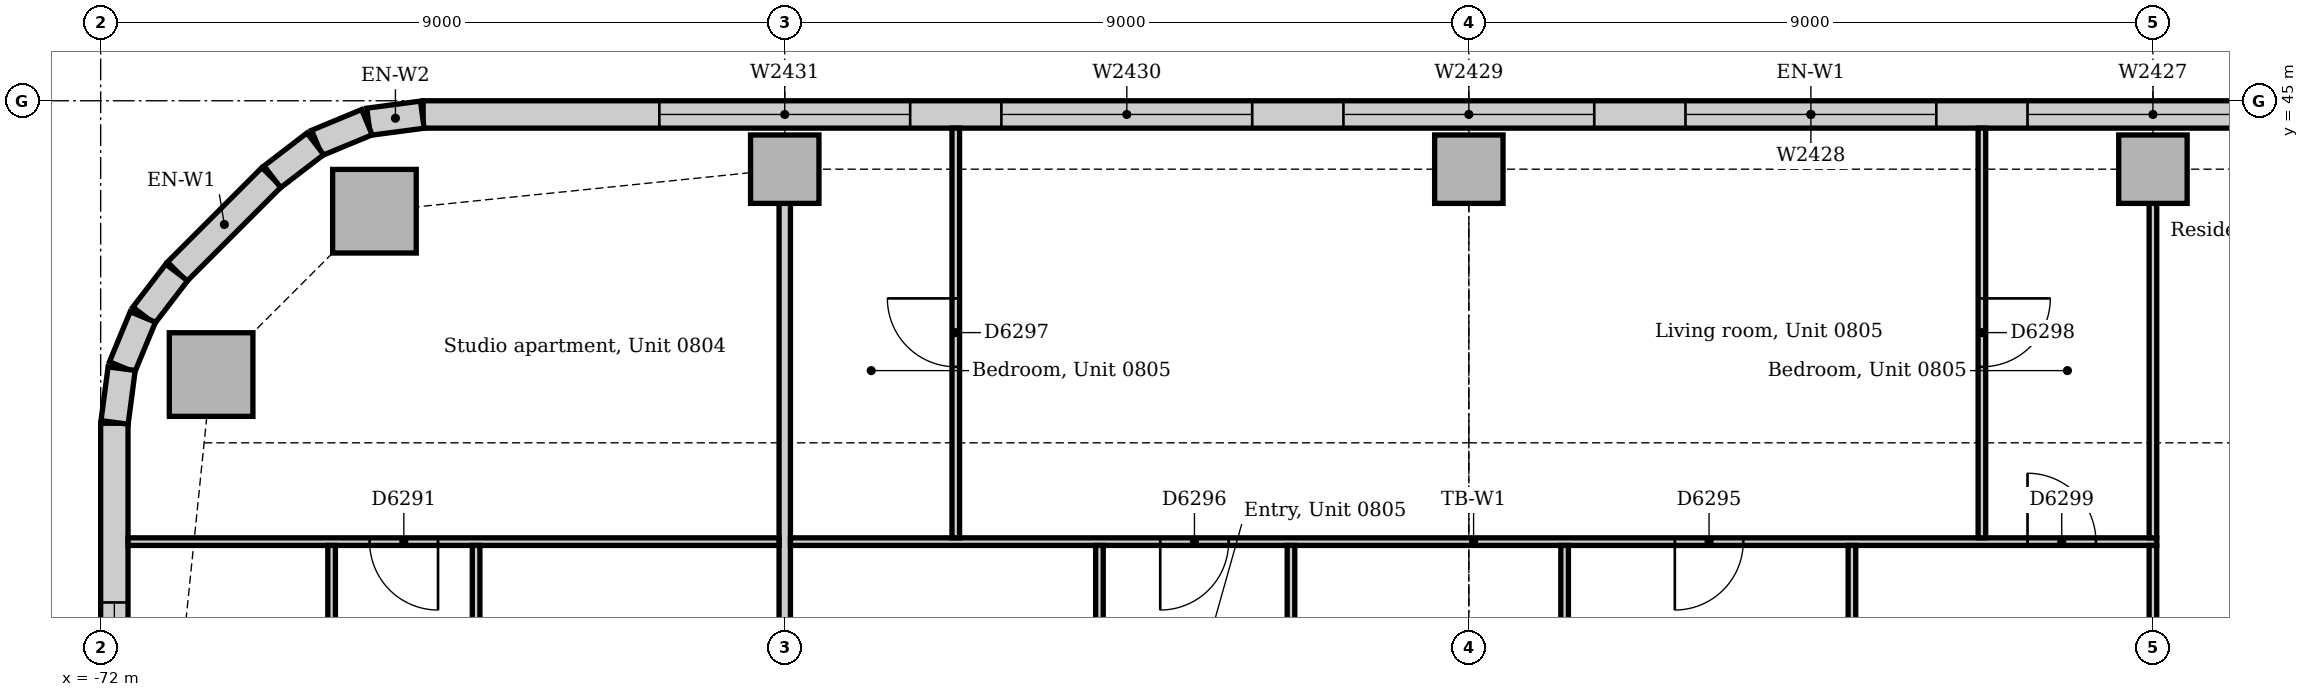
"""IFC4 building model, lengths in metres.
Left out: names, types, materials, properties, quantities, classifications, styles, units other than length and angle.
Written with IfcOpenShell. Run it as: python <this file> out.ifc"""

import sys

from ifc_helpers import new_model, si_unit, direction, frame, frame_2d, origin, origin_2d, place, context, subcontext, project, spatial, rectangle, extrude, element, fill, save


model = new_model("IFC4")
c1 = context("Model", 3, precision=1e-05, world=origin(), true_north=direction((0.0, 1.0)))
c2 = subcontext(c1, "Body", "Model", "MODEL_VIEW")
j1 = project(units=[si_unit("LENGTHUNIT", "METRE"), si_unit("PLANEANGLEUNIT", "RADIAN")], contexts=[c1])
p1 = place(None, origin())
s1 = spatial("IfcSite", under=j1, at=p1, CompositionType="ELEMENT")
p2 = place(p1, origin())
s2 = spatial("IfcBuilding", under=s1, at=p2, CompositionType="ELEMENT")
p3 = place(p2, frame((0.0, 0.0, 38.0)))
s3 = spatial("IfcBuildingStorey", under=s2, at=p3, CompositionType="ELEMENT", Elevation=38.0)
for number, where, z_axis, x_axis in (
    (1, (-68.398, 43.547, 0.0), (0.0, 0.0, 1.0), (1.0, 0.0, 0.0)),
    (2, (-70.547, 41.398, 0.0), (0.0, 0.0, 1.0), (1.0, 0.0, 0.0)),
):
    element("IfcColumn", number, at=place(p3, frame(where, z_axis=z_axis, x_axis=x_axis)), inside=s3, PredefinedType="COLUMN", context=c2, shape_type="SweptSolid", body=[
        extrude(rectangle(XDim=1.1, YDim=1.1, at=origin_2d()), origin(), (0.0, 0.0, 1.0), 3.85),
    ])
for number, where, z_axis, x_axis in (
    (3, (-63.0, 44.1, 0.0), (0.0, 0.0, 1.0), (1.0, 0.0, 0.0)),
    (4, (-54.0, 44.1, 0.0), (0.0, 0.0, 1.0), (1.0, 0.0, 0.0)),
    (5, (-45.0, 44.1, 0.0), (0.0, 0.0, 1.0), (1.0, 0.0, 0.0)),
):
    element("IfcColumn", number, at=place(p3, frame(where, z_axis=z_axis, x_axis=x_axis)), inside=s3, PredefinedType="COLUMN", context=c2, shape_type="SweptSolid", body=[
        extrude(rectangle(XDim=0.9, YDim=0.9, at=origin_2d()), origin(), (0.0, 0.0, 1.0), 3.85),
    ])
p4 = place(p3, frame((-31.243, 44.82, 0.0), z_axis=(0.0, 0.0, 1.0), x_axis=(-1.0, 0.0, 0.0)))
e6 = element("IfcWall", 6, at=p4, inside=s3, PredefinedType="STANDARD", context=c2, shape_type="SweptSolid", body=[
    extrude(rectangle(XDim=36.515, YDim=0.36, at=frame_2d((18.257, 0.0))), origin(), (0.0, 0.0, 1.0), 3.85),
])
p5 = place(p4, frame((3.107, 0.0, 0.9)))
e7 = element("IfcOpeningElement", 7, at=p5, cuts=e6, PredefinedType="OPENING", context=c2, shape_type="SweptSolid", body=[
    extrude(rectangle(XDim=3.3, YDim=1.6, at=frame_2d((1.65, 0.8))), frame((0.0, 0.19, 0.0), z_axis=(0.0, -1.0, 0.0), x_axis=(1.0, 0.0, 0.0)), (0.0, 0.0, 1.0), 0.38),
])
p6 = place(p4, frame((7.607, 0.0, 0.9)))
e8 = element("IfcOpeningElement", 8, at=p6, cuts=e6, PredefinedType="OPENING", context=c2, shape_type="SweptSolid", body=[
    extrude(rectangle(XDim=3.3, YDim=1.6, at=frame_2d((1.65, 0.8))), frame((0.0, 0.19, 0.0), z_axis=(0.0, -1.0, 0.0), x_axis=(1.0, 0.0, 0.0)), (0.0, 0.0, 1.0), 0.38),
])
p7 = place(p4, frame((12.107, 0.0, 0.9)))
e9 = element("IfcOpeningElement", 9, at=p7, cuts=e6, PredefinedType="OPENING", context=c2, shape_type="SweptSolid", body=[
    extrude(rectangle(XDim=3.3, YDim=1.6, at=frame_2d((1.65, 0.8))), frame((0.0, 0.19, 0.0), z_axis=(0.0, -1.0, 0.0), x_axis=(1.0, 0.0, 0.0)), (0.0, 0.0, 1.0), 0.38),
])
p8 = place(p4, frame((16.607, 0.0, 0.9)))
e10 = element("IfcOpeningElement", 10, at=p8, cuts=e6, PredefinedType="OPENING", context=c2, shape_type="SweptSolid", body=[
    extrude(rectangle(XDim=3.3, YDim=1.6, at=frame_2d((1.65, 0.8))), frame((0.0, 0.19, 0.0), z_axis=(0.0, -1.0, 0.0), x_axis=(1.0, 0.0, 0.0)), (0.0, 0.0, 1.0), 0.38),
])
p9 = place(p4, frame((21.107, 0.0, 0.9)))
e11 = element("IfcOpeningElement", 11, at=p9, cuts=e6, PredefinedType="OPENING", context=c2, shape_type="SweptSolid", body=[
    extrude(rectangle(XDim=3.3, YDim=1.6, at=frame_2d((1.65, 0.8))), frame((0.0, 0.19, 0.0), z_axis=(0.0, -1.0, 0.0), x_axis=(1.0, 0.0, 0.0)), (0.0, 0.0, 1.0), 0.38),
])
p10 = place(p4, frame((25.607, 0.0, 0.9)))
e12 = element("IfcOpeningElement", 12, at=p10, cuts=e6, PredefinedType="OPENING", context=c2, shape_type="SweptSolid", body=[
    extrude(rectangle(XDim=3.3, YDim=1.6, at=frame_2d((1.65, 0.8))), frame((0.0, 0.19, 0.0), z_axis=(0.0, -1.0, 0.0), x_axis=(1.0, 0.0, 0.0)), (0.0, 0.0, 1.0), 0.38),
])
p11 = place(p4, frame((30.107, 0.0, 0.9)))
e13 = element("IfcOpeningElement", 13, at=p11, cuts=e6, PredefinedType="OPENING", context=c2, shape_type="SweptSolid", body=[
    extrude(rectangle(XDim=3.3, YDim=1.6, at=frame_2d((1.65, 0.8))), frame((0.0, 0.19, 0.0), z_axis=(0.0, -1.0, 0.0), x_axis=(1.0, 0.0, 0.0)), (0.0, 0.0, 1.0), 0.38),
])
p12 = place(p3, frame((-69.751, 43.994, 0.0), z_axis=(0.0, 0.0, 1.0), x_axis=(-0.707106781187, -0.707106781187, 0.0)))
e14 = element("IfcWall", 14, at=p12, inside=s3, PredefinedType="STANDARD", context=c2, shape_type="SweptSolid", body=[
    extrude(rectangle(XDim=1.757, YDim=0.36, at=frame_2d((0.879, 0.0))), origin(), (0.0, 0.0, 1.0), 3.85),
])
p13 = place(p3, frame((-71.82, 40.757, 0.0), z_axis=(0.0, 0.0, 1.0), x_axis=(0.0, -1.0, 0.0)))
e15 = element("IfcWall", 15, at=p13, inside=s3, PredefinedType="STANDARD", context=c2, shape_type="SweptSolid", body=[
    extrude(rectangle(XDim=26.015, YDim=0.36, at=frame_2d((13.007, 0.0))), origin(), (0.0, 0.0, 1.0), 3.85),
])
p14 = place(p13, frame((2.357, 0.0, 0.9)))
e16 = element("IfcOpeningElement", 16, at=p14, cuts=e15, PredefinedType="OPENING", context=c2, shape_type="SweptSolid", body=[
    extrude(rectangle(XDim=3.3, YDim=1.6, at=frame_2d((1.65, 0.8))), frame((0.0, 0.19, 0.0), z_axis=(0.0, -1.0, 0.0), x_axis=(1.0, 0.0, 0.0)), (0.0, 0.0, 1.0), 0.38),
])
p15 = place(p13, frame((7.057, 0.0, 0.9)))
e17 = element("IfcOpeningElement", 17, at=p15, cuts=e15, PredefinedType="OPENING", context=c2, shape_type="SweptSolid", body=[
    extrude(rectangle(XDim=3.3, YDim=1.6, at=frame_2d((1.65, 0.8))), frame((0.0, 0.19, 0.0), z_axis=(0.0, -1.0, 0.0), x_axis=(1.0, 0.0, 0.0)), (0.0, 0.0, 1.0), 0.38),
])
p16 = place(p13, frame((11.357, 0.0, 0.9)))
e18 = element("IfcOpeningElement", 18, at=p16, cuts=e15, PredefinedType="OPENING", context=c2, shape_type="SweptSolid", body=[
    extrude(rectangle(XDim=3.3, YDim=1.6, at=frame_2d((1.65, 0.8))), frame((0.0, 0.19, 0.0), z_axis=(0.0, -1.0, 0.0), x_axis=(1.0, 0.0, 0.0)), (0.0, 0.0, 1.0), 0.38),
])
p17 = place(p13, frame((15.857, 0.0, 0.9)))
e19 = element("IfcOpeningElement", 19, at=p17, cuts=e15, PredefinedType="OPENING", context=c2, shape_type="SweptSolid", body=[
    extrude(rectangle(XDim=3.3, YDim=1.6, at=frame_2d((1.65, 0.8))), frame((0.0, 0.19, 0.0), z_axis=(0.0, -1.0, 0.0), x_axis=(1.0, 0.0, 0.0)), (0.0, 0.0, 1.0), 0.38),
])
p18 = place(p13, frame((20.957, 0.0, 0.9)))
e20 = element("IfcOpeningElement", 20, at=p18, cuts=e15, PredefinedType="OPENING", context=c2, shape_type="SweptSolid", body=[
    extrude(rectangle(XDim=3.3, YDim=1.6, at=frame_2d((1.65, 0.8))), frame((0.0, 0.19, 0.0), z_axis=(0.0, -1.0, 0.0), x_axis=(1.0, 0.0, 0.0)), (0.0, 0.0, 1.0), 0.38),
])
for number, where, z_axis, x_axis in (
    (21, (-67.769, 44.817, 0.0), (0.0, 0.0, 1.0), (-0.991, -0.131, 0.0)),
    (22, (-68.497, 44.718, 0.0), (0.0, 0.0, 1.0), (-0.924, -0.383, 0.0)),
):
    element("IfcWall", number, at=place(p3, frame(where, z_axis=z_axis, x_axis=x_axis)), inside=s3, PredefinedType="STANDARD", context=c2, shape_type="SweptSolid", body=[
        extrude(rectangle(XDim=0.713, YDim=0.36, at=frame_2d((0.356, 0.0))), origin(), (0.0, 0.0, 1.0), 3.85),
    ])
for number, where, z_axis, x_axis in (
    (23, (-69.175, 44.434, 0.0), (0.0, 0.0, 1.0), (-0.793, -0.609, 0.0)),
    (24, (-71.0, 42.741, 0.0), (0.0, 0.0, 1.0), (-0.609, -0.793, 0.0)),
):
    element("IfcWall", number, at=place(p3, frame(where, z_axis=z_axis, x_axis=x_axis)), inside=s3, PredefinedType="STANDARD", context=c2, shape_type="SweptSolid", body=[
        extrude(rectangle(XDim=0.713, YDim=0.36, at=frame_2d((0.357, 0.0))), origin(), (0.0, 0.0, 1.0), 3.85),
    ])
for number, where, z_axis, x_axis in (
    (25, (-71.445, 42.156, 0.0), (0.0, 0.0, 1.0), (-0.383, -0.924, 0.0)),
    (26, (-71.724, 41.476, 0.0), (0.0, 0.0, 1.0), (-0.131, -0.991, 0.0)),
):
    element("IfcWall", number, at=place(p3, frame(where, z_axis=z_axis, x_axis=x_axis)), inside=s3, PredefinedType="STANDARD", context=c2, shape_type="SweptSolid", body=[
        extrude(rectangle(XDim=0.713, YDim=0.36, at=frame_2d((0.356, 0.0))), origin(), (0.0, 0.0, 1.0), 3.85),
    ])
p19 = place(p3, frame((-63.0, 36.4, 0.0), z_axis=(0.0, 0.0, 1.0), x_axis=(0.0, 1.0, 0.0)))
e27 = element("IfcWall", 27, at=p19, inside=s3, PredefinedType="PARTITIONING", context=c2, shape_type="SweptSolid", body=[
    extrude(rectangle(XDim=7.25, YDim=0.15, at=frame_2d((3.625, 0.0))), origin(), (0.0, 0.0, 1.0), 3.158),
])
p20 = place(p3, frame((-62.925, 39.2, 0.0), z_axis=(0.0, 0.0, 1.0), x_axis=(1.0, 0.0, 0.0)))
e28 = element("IfcWall", 28, at=p20, inside=s3, PredefinedType="PARTITIONING", context=c2, shape_type="SweptSolid", body=[
    extrude(rectangle(XDim=17.975, YDim=0.1, at=frame_2d((8.988, 0.0))), origin(), (0.0, 0.0, 1.0), 3.85),
])
p21 = place(p20, frame((11.635, 0.0, 0.0)))
e29 = element("IfcOpeningElement", 29, at=p21, cuts=e28, PredefinedType="OPENING", context=c2, shape_type="SweptSolid", body=[
    extrude(rectangle(XDim=0.9, YDim=2.1, at=frame_2d((0.45, 1.05))), frame((0.0, 0.06, 0.0), z_axis=(0.0, -1.0, 0.0), x_axis=(1.0, 0.0, 0.0)), (0.0, 0.0, 1.0), 0.12),
])
p22 = place(p20, frame((4.865, 0.0, 0.0)))
e30 = element("IfcOpeningElement", 30, at=p22, cuts=e28, PredefinedType="OPENING", context=c2, shape_type="SweptSolid", body=[
    extrude(rectangle(XDim=0.9, YDim=2.1, at=frame_2d((0.45, 1.05))), frame((0.0, 0.06, 0.0), z_axis=(0.0, -1.0, 0.0), x_axis=(1.0, 0.0, 0.0)), (0.0, 0.0, 1.0), 0.12),
])
p23 = place(p20, frame((16.275, 0.0, 0.0)))
e31 = element("IfcOpeningElement", 31, at=p23, cuts=e28, PredefinedType="OPENING", context=c2, shape_type="SweptSolid", body=[
    extrude(rectangle(XDim=0.9, YDim=2.1, at=frame_2d((0.45, 1.05))), frame((0.0, 0.06, 0.0), z_axis=(0.0, -1.0, 0.0), x_axis=(1.0, 0.0, 0.0)), (0.0, 0.0, 1.0), 0.12),
])
p24 = place(p3, frame((-71.64, 39.2, 0.0), z_axis=(0.0, 0.0, 1.0), x_axis=(1.0, 0.0, 0.0)))
e32 = element("IfcWall", 32, at=p24, inside=s3, PredefinedType="PARTITIONING", context=c2, shape_type="SweptSolid", body=[
    extrude(rectangle(XDim=8.565, YDim=0.1, at=frame_2d((4.282, 0.0))), origin(), (0.0, 0.0, 1.0), 3.85),
])
p25 = place(p24, frame((3.178, 0.0, 0.0)))
e33 = element("IfcOpeningElement", 33, at=p25, cuts=e32, PredefinedType="OPENING", context=c2, shape_type="SweptSolid", body=[
    extrude(rectangle(XDim=0.9, YDim=2.1, at=frame_2d((0.45, 1.05))), frame((0.0, 0.06, 0.0), z_axis=(0.0, -1.0, 0.0), x_axis=(1.0, 0.0, 0.0)), (0.0, 0.0, 1.0), 0.12),
])
p26 = place(p3, frame((-45.0, 39.25, 0.0), z_axis=(0.0, 0.0, 1.0), x_axis=(0.0, 1.0, 0.0)))
e34 = element("IfcWall", 34, at=p26, inside=s3, PredefinedType="PARTITIONING", context=c2, shape_type="SweptSolid", body=[
    extrude(rectangle(XDim=4.4, YDim=0.1, at=frame_2d((2.2, 0.0))), origin(), (0.0, 0.0, 1.0), 3.158),
])
p27 = place(p3, frame((-45.0, 36.4, 0.0), z_axis=(0.0, 0.0, 1.0), x_axis=(0.0, 1.0, 0.0)))
e35 = element("IfcWall", 35, at=p27, inside=s3, PredefinedType="PARTITIONING", context=c2, shape_type="SweptSolid", body=[
    extrude(rectangle(XDim=2.75, YDim=0.1, at=frame_2d((1.375, 0.0))), origin(), (0.0, 0.0, 1.0), 3.158),
])
p28 = place(p3, frame((-60.75, 39.25, 0.0), z_axis=(0.0, 0.0, 1.0), x_axis=(0.0, 1.0, 0.0)))
e36 = element("IfcWall", 36, at=p28, inside=s3, PredefinedType="PARTITIONING", context=c2, shape_type="SweptSolid", body=[
    extrude(rectangle(XDim=5.39, YDim=0.1, at=frame_2d((2.695, 0.0))), origin(), (0.0, 0.0, 1.0), 3.85),
])
p29 = place(p28, frame((2.25, 0.0, 0.0)))
e37 = element("IfcOpeningElement", 37, at=p29, cuts=e36, PredefinedType="OPENING", context=c2, shape_type="SweptSolid", body=[
    extrude(rectangle(XDim=0.9, YDim=2.1, at=frame_2d((0.45, 1.05))), frame((0.0, 0.06, 0.0), z_axis=(0.0, -1.0, 0.0), x_axis=(1.0, 0.0, 0.0)), (0.0, 0.0, 1.0), 0.12),
])
p30 = place(p3, frame((-47.25, 39.25, 0.0), z_axis=(0.0, 0.0, 1.0), x_axis=(0.0, 1.0, 0.0)))
e38 = element("IfcWall", 38, at=p30, inside=s3, PredefinedType="PARTITIONING", context=c2, shape_type="SweptSolid", body=[
    extrude(rectangle(XDim=5.39, YDim=0.1, at=frame_2d((2.695, 0.0))), origin(), (0.0, 0.0, 1.0), 3.85),
])
p31 = place(p30, frame((2.25, 0.0, 0.0)))
e39 = element("IfcOpeningElement", 39, at=p31, cuts=e38, PredefinedType="OPENING", context=c2, shape_type="SweptSolid", body=[
    extrude(rectangle(XDim=0.9, YDim=2.1, at=frame_2d((0.45, 1.05))), frame((0.0, 0.06, 0.0), z_axis=(0.0, -1.0, 0.0), x_axis=(1.0, 0.0, 0.0)), (0.0, 0.0, 1.0), 0.12),
])
p32 = place(p3, frame((-68.962, 36.075, 0.0), z_axis=(0.0, 0.0, 1.0), x_axis=(0.0, 1.0, 0.0)))
e40 = element("IfcWall", 40, at=p32, inside=s3, PredefinedType="PARTITIONING", context=c2, shape_type="SweptSolid", body=[
    extrude(rectangle(XDim=3.075, YDim=0.1, at=frame_2d((1.538, 0.0))), origin(), (0.0, 0.0, 1.0), 3.85),
])
p33 = place(p32, frame((1.1, 0.0, 0.0)))
e41 = element("IfcOpeningElement", 41, at=p33, cuts=e40, PredefinedType="OPENING", context=c2, shape_type="SweptSolid", body=[
    extrude(rectangle(XDim=0.9, YDim=2.1, at=frame_2d((0.45, 1.05))), frame((0.0, 0.06, 0.0), z_axis=(0.0, -1.0, 0.0), x_axis=(1.0, 0.0, 0.0)), (0.0, 0.0, 1.0), 0.12),
])
p34 = place(p3, frame((-67.061, 36.075, 0.0), z_axis=(0.0, 0.0, 1.0), x_axis=(0.0, 1.0, 0.0)))
e42 = element("IfcWall", 42, at=p34, inside=s3, PredefinedType="PARTITIONING", context=c2, shape_type="SweptSolid", body=[
    extrude(rectangle(XDim=3.075, YDim=0.1, at=frame_2d((1.538, 0.0))), origin(), (0.0, 0.0, 1.0), 3.85),
])
p35 = place(p34, frame((1.1, 0.0, 0.0)))
e43 = element("IfcOpeningElement", 43, at=p35, cuts=e42, PredefinedType="OPENING", context=c2, shape_type="SweptSolid", body=[
    extrude(rectangle(XDim=0.9, YDim=2.1, at=frame_2d((0.45, 1.05))), frame((0.0, 0.06, 0.0), z_axis=(0.0, -1.0, 0.0), x_axis=(1.0, 0.0, 0.0)), (0.0, 0.0, 1.0), 0.12),
])
p36 = place(p3, frame((-58.86, 36.075, 0.0), z_axis=(0.0, 0.0, 1.0), x_axis=(0.0, 1.0, 0.0)))
e44 = element("IfcWall", 44, at=p36, inside=s3, PredefinedType="PARTITIONING", context=c2, shape_type="SweptSolid", body=[
    extrude(rectangle(XDim=3.075, YDim=0.1, at=frame_2d((1.538, 0.0))), origin(), (0.0, 0.0, 1.0), 3.85),
])
p37 = place(p36, frame((1.1, 0.0, 0.0)))
e45 = element("IfcOpeningElement", 45, at=p37, cuts=e44, PredefinedType="OPENING", context=c2, shape_type="SweptSolid", body=[
    extrude(rectangle(XDim=0.9, YDim=2.1, at=frame_2d((0.45, 1.05))), frame((0.0, 0.06, 0.0), z_axis=(0.0, -1.0, 0.0), x_axis=(1.0, 0.0, 0.0)), (0.0, 0.0, 1.0), 0.12),
])
p38 = place(p3, frame((-56.34, 36.075, 0.0), z_axis=(0.0, 0.0, 1.0), x_axis=(0.0, 1.0, 0.0)))
e46 = element("IfcWall", 46, at=p38, inside=s3, PredefinedType="PARTITIONING", context=c2, shape_type="SweptSolid", body=[
    extrude(rectangle(XDim=3.075, YDim=0.1, at=frame_2d((1.538, 0.0))), origin(), (0.0, 0.0, 1.0), 3.85),
])
p39 = place(p38, frame((1.1, 0.0, 0.0)))
e47 = element("IfcOpeningElement", 47, at=p39, cuts=e46, PredefinedType="OPENING", context=c2, shape_type="SweptSolid", body=[
    extrude(rectangle(XDim=0.9, YDim=2.1, at=frame_2d((0.45, 1.05))), frame((0.0, 0.06, 0.0), z_axis=(0.0, -1.0, 0.0), x_axis=(1.0, 0.0, 0.0)), (0.0, 0.0, 1.0), 0.12),
])
for number, where, z_axis, x_axis in (
    (48, (-52.74, 36.075, 0.0), (0.0, 0.0, 1.0), (0.0, 1.0, 0.0)),
    (49, (-48.96, 36.075, 0.0), (0.0, 0.0, 1.0), (0.0, 1.0, 0.0)),
):
    element("IfcWall", number, at=place(p3, frame(where, z_axis=z_axis, x_axis=x_axis)), inside=s3, PredefinedType="PARTITIONING", context=c2, shape_type="SweptSolid", body=[
        extrude(rectangle(XDim=3.075, YDim=0.1, at=frame_2d((1.538, 0.0))), origin(), (0.0, 0.0, 1.0), 3.85),
    ])
p40 = place(p7, origin())
e50 = element("IfcWindow", 50, at=p40, inside=s3, PartitioningType="SINGLE_PANEL", PredefinedType="WINDOW", context=c2, shape_type="SweptSolid", body=[
    extrude(rectangle(XDim=3.3, YDim=1.6, at=frame_2d((1.65, 0.8))), frame((0.0, 0.13, 0.0), z_axis=(0.0, -1.0, 0.0), x_axis=(1.0, 0.0, 0.0)), (0.0, 0.0, 1.0), 0.06),
])
fill(e9, e50)
p41 = place(p8, origin())
e51 = element("IfcWindow", 51, at=p41, inside=s3, PartitioningType="SINGLE_PANEL", PredefinedType="WINDOW", context=c2, shape_type="SweptSolid", body=[
    extrude(rectangle(XDim=3.3, YDim=1.6, at=frame_2d((1.65, 0.8))), frame((0.0, 0.13, 0.0), z_axis=(0.0, -1.0, 0.0), x_axis=(1.0, 0.0, 0.0)), (0.0, 0.0, 1.0), 0.06),
])
fill(e10, e51)
p42 = place(p9, origin())
e52 = element("IfcWindow", 52, at=p42, inside=s3, PartitioningType="SINGLE_PANEL", PredefinedType="WINDOW", context=c2, shape_type="SweptSolid", body=[
    extrude(rectangle(XDim=3.3, YDim=1.6, at=frame_2d((1.65, 0.8))), frame((0.0, 0.13, 0.0), z_axis=(0.0, -1.0, 0.0), x_axis=(1.0, 0.0, 0.0)), (0.0, 0.0, 1.0), 0.06),
])
fill(e11, e52)
p43 = place(p10, origin())
e53 = element("IfcWindow", 53, at=p43, inside=s3, PartitioningType="SINGLE_PANEL", PredefinedType="WINDOW", context=c2, shape_type="SweptSolid", body=[
    extrude(rectangle(XDim=3.3, YDim=1.6, at=frame_2d((1.65, 0.8))), frame((0.0, 0.13, 0.0), z_axis=(0.0, -1.0, 0.0), x_axis=(1.0, 0.0, 0.0)), (0.0, 0.0, 1.0), 0.06),
])
fill(e12, e53)
p44 = place(p11, origin())
e54 = element("IfcWindow", 54, at=p44, inside=s3, PartitioningType="SINGLE_PANEL", PredefinedType="WINDOW", context=c2, shape_type="SweptSolid", body=[
    extrude(rectangle(XDim=3.3, YDim=1.6, at=frame_2d((1.65, 0.8))), frame((0.0, 0.13, 0.0), z_axis=(0.0, -1.0, 0.0), x_axis=(1.0, 0.0, 0.0)), (0.0, 0.0, 1.0), 0.06),
])
fill(e13, e54)
p45 = place(p14, origin())
e55 = element("IfcWindow", 55, at=p45, inside=s3, PartitioningType="SINGLE_PANEL", PredefinedType="WINDOW", context=c2, shape_type="SweptSolid", body=[
    extrude(rectangle(XDim=3.3, YDim=1.6, at=frame_2d((1.65, 0.8))), frame((0.0, 0.13, 0.0), z_axis=(0.0, -1.0, 0.0), x_axis=(1.0, 0.0, 0.0)), (0.0, 0.0, 1.0), 0.06),
])
fill(e16, e55)
p46 = place(p25, frame((0.9, 0.0, 0.0), z_axis=(0.0, 0.0, 1.0), x_axis=(-1.0, 0.0, 0.0)))
e56 = element("IfcDoor", 56, at=p46, inside=s3, OperationType="SINGLE_SWING_LEFT", PredefinedType="DOOR", context=c2, shape_type="SweptSolid", body=[
    extrude(rectangle(XDim=0.9, YDim=2.1, at=frame_2d((0.45, 1.05))), frame((0.0, 0.025, 0.0), z_axis=(0.0, -1.0, 0.0), x_axis=(1.0, 0.0, 0.0)), (0.0, 0.0, 1.0), 0.05),
])
fill(e33, e56)
p47 = place(p21, frame((0.9, 0.0, 0.0), z_axis=(0.0, 0.0, 1.0), x_axis=(-1.0, 0.0, 0.0)))
e57 = element("IfcDoor", 57, at=p47, inside=s3, OperationType="SINGLE_SWING_RIGHT", PredefinedType="DOOR", context=c2, shape_type="SweptSolid", body=[
    extrude(rectangle(XDim=0.9, YDim=2.1, at=frame_2d((0.45, 1.05))), frame((0.0, 0.025, 0.0), z_axis=(0.0, -1.0, 0.0), x_axis=(1.0, 0.0, 0.0)), (0.0, 0.0, 1.0), 0.05),
])
fill(e29, e57)
p48 = place(p22, frame((0.9, 0.0, 0.0), z_axis=(0.0, 0.0, 1.0), x_axis=(-1.0, 0.0, 0.0)))
e58 = element("IfcDoor", 58, at=p48, inside=s3, OperationType="SINGLE_SWING_RIGHT", PredefinedType="DOOR", context=c2, shape_type="SweptSolid", body=[
    extrude(rectangle(XDim=0.9, YDim=2.1, at=frame_2d((0.45, 1.05))), frame((0.0, 0.025, 0.0), z_axis=(0.0, -1.0, 0.0), x_axis=(1.0, 0.0, 0.0)), (0.0, 0.0, 1.0), 0.05),
])
fill(e30, e58)
p49 = place(p29, origin())
e59 = element("IfcDoor", 59, at=p49, inside=s3, OperationType="SINGLE_SWING_RIGHT", PredefinedType="DOOR", context=c2, shape_type="SweptSolid", body=[
    extrude(rectangle(XDim=0.9, YDim=2.1, at=frame_2d((0.45, 1.05))), frame((0.0, 0.025, 0.0), z_axis=(0.0, -1.0, 0.0), x_axis=(1.0, 0.0, 0.0)), (0.0, 0.0, 1.0), 0.05),
])
fill(e37, e59)
p50 = place(p31, frame((0.9, 0.0, 0.0), z_axis=(0.0, 0.0, 1.0), x_axis=(-1.0, 0.0, 0.0)))
e60 = element("IfcDoor", 60, at=p50, inside=s3, OperationType="SINGLE_SWING_LEFT", PredefinedType="DOOR", context=c2, shape_type="SweptSolid", body=[
    extrude(rectangle(XDim=0.9, YDim=2.1, at=frame_2d((0.45, 1.05))), frame((0.0, 0.025, 0.0), z_axis=(0.0, -1.0, 0.0), x_axis=(1.0, 0.0, 0.0)), (0.0, 0.0, 1.0), 0.05),
])
fill(e39, e60)
p51 = place(p23, origin())
e61 = element("IfcDoor", 61, at=p51, inside=s3, OperationType="SINGLE_SWING_LEFT", PredefinedType="DOOR", context=c2, shape_type="SweptSolid", body=[
    extrude(rectangle(XDim=0.9, YDim=2.1, at=frame_2d((0.45, 1.05))), frame((0.0, 0.025, 0.0), z_axis=(0.0, -1.0, 0.0), x_axis=(1.0, 0.0, 0.0)), (0.0, 0.0, 1.0), 0.05),
])
fill(e31, e61)
save(model, sys.argv[1])
